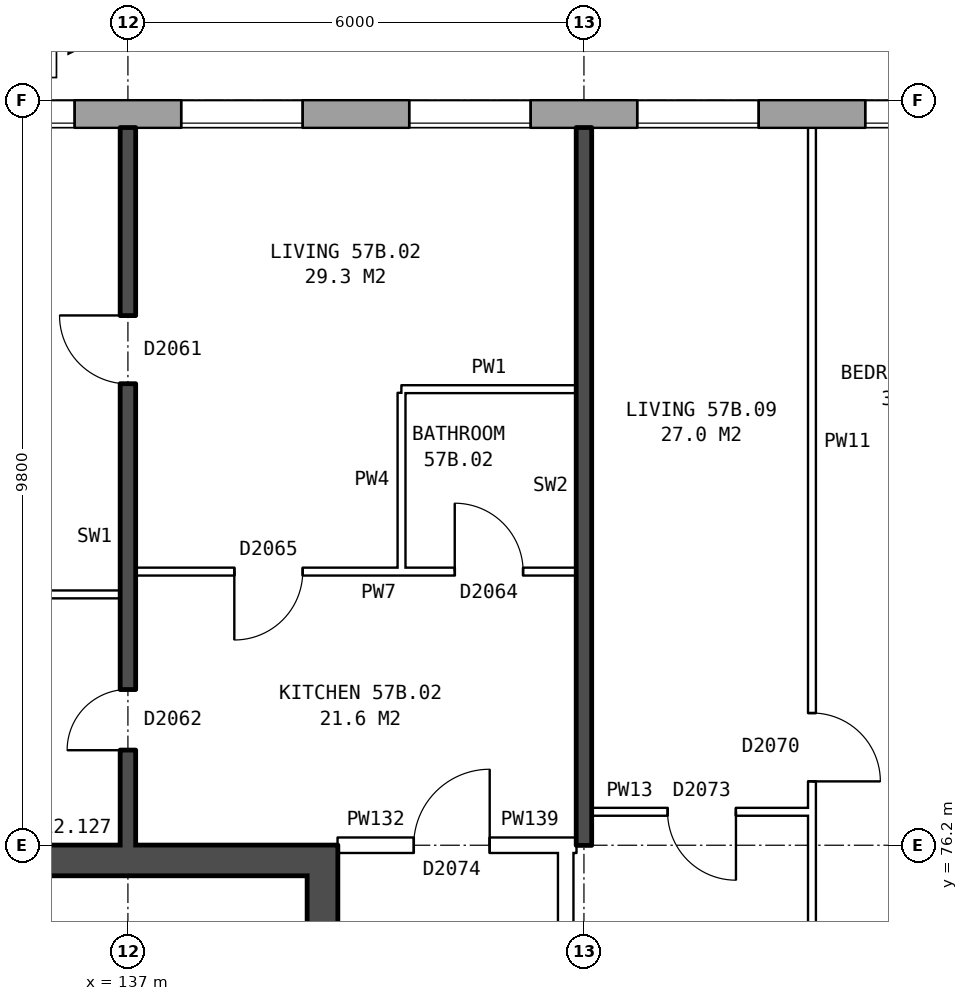
"""IFC4 building model, lengths in metres.
Left out: names, types, materials, properties, quantities, classifications, styles, units other than length and angle.
Written with IfcOpenShell. Run it as: python <this file> out.ifc"""

import sys

from ifc_helpers import new_model, si_unit, direction, frame, frame_2d, origin, place, context, subcontext, project, spatial, rectangle, extrude, element, fill, save


model = new_model("IFC4")
c1 = context("Model", 3, precision=1e-05, world=origin(), true_north=direction((0.0, 1.0)))
c2 = subcontext(c1, "Body", "Model", "MODEL_VIEW")
j1 = project(units=[si_unit("LENGTHUNIT", "METRE"), si_unit("PLANEANGLEUNIT", "RADIAN")], contexts=[c1])
p1 = place(None, origin())
s1 = spatial("IfcSite", under=j1, at=p1, CompositionType="ELEMENT")
p2 = place(p1, origin())
s2 = spatial("IfcBuilding", under=s1, at=p2, CompositionType="ELEMENT")
p3 = place(p2, frame((0.0, 0.0, 202.8)))
s3 = spatial("IfcBuildingStorey", under=s2, at=p3, CompositionType="ELEMENT", Elevation=202.8)
p4 = place(p3, frame((165.925, 85.82, 0.0), z_axis=(0.0, 0.0, 1.0), x_axis=(-1.0, 0.0, 0.0)))
e1 = element("IfcWall", 1, at=p4, inside=s3, PredefinedType="STANDARD", context=c2, shape_type="SweptSolid", body=[
    extrude(rectangle(XDim=33.875, YDim=0.36, at=frame_2d((16.938, 0.0))), origin(), (0.0, 0.0, 1.0), 2.85),
])
p5 = place(p4, frame((2.625, 0.0, 0.8)))
e2 = element("IfcOpeningElement", 2, at=p5, cuts=e1, PredefinedType="OPENING", context=c2, shape_type="SweptSolid", body=[
    extrude(rectangle(XDim=1.6, YDim=1.8, at=frame_2d((0.8, 0.9))), frame((0.0, 0.19, 0.0), z_axis=(0.0, -1.0, 0.0), x_axis=(1.0, 0.0, 0.0)), (0.0, 0.0, 1.0), 0.38),
])
p6 = place(p4, frame((5.625, 0.0, 0.8)))
e3 = element("IfcOpeningElement", 3, at=p6, cuts=e1, PredefinedType="OPENING", context=c2, shape_type="SweptSolid", body=[
    extrude(rectangle(XDim=1.6, YDim=1.8, at=frame_2d((0.8, 0.9))), frame((0.0, 0.19, 0.0), z_axis=(0.0, -1.0, 0.0), x_axis=(1.0, 0.0, 0.0)), (0.0, 0.0, 1.0), 0.38),
])
p7 = place(p4, frame((8.625, 0.0, 0.8)))
e4 = element("IfcOpeningElement", 4, at=p7, cuts=e1, PredefinedType="OPENING", context=c2, shape_type="SweptSolid", body=[
    extrude(rectangle(XDim=1.6, YDim=1.8, at=frame_2d((0.8, 0.9))), frame((0.0, 0.19, 0.0), z_axis=(0.0, -1.0, 0.0), x_axis=(1.0, 0.0, 0.0)), (0.0, 0.0, 1.0), 0.38),
])
p8 = place(p4, frame((11.625, 0.0, 0.8)))
e5 = element("IfcOpeningElement", 5, at=p8, cuts=e1, PredefinedType="OPENING", context=c2, shape_type="SweptSolid", body=[
    extrude(rectangle(XDim=1.6, YDim=1.8, at=frame_2d((0.8, 0.9))), frame((0.0, 0.19, 0.0), z_axis=(0.0, -1.0, 0.0), x_axis=(1.0, 0.0, 0.0)), (0.0, 0.0, 1.0), 0.38),
])
p9 = place(p4, frame((14.625, 0.0, 0.8)))
e6 = element("IfcOpeningElement", 6, at=p9, cuts=e1, PredefinedType="OPENING", context=c2, shape_type="SweptSolid", body=[
    extrude(rectangle(XDim=1.6, YDim=1.8, at=frame_2d((0.8, 0.9))), frame((0.0, 0.19, 0.0), z_axis=(0.0, -1.0, 0.0), x_axis=(1.0, 0.0, 0.0)), (0.0, 0.0, 1.0), 0.38),
])
p10 = place(p4, frame((17.625, 0.0, 0.8)))
e7 = element("IfcOpeningElement", 7, at=p10, cuts=e1, PredefinedType="OPENING", context=c2, shape_type="SweptSolid", body=[
    extrude(rectangle(XDim=1.6, YDim=1.8, at=frame_2d((0.8, 0.9))), frame((0.0, 0.19, 0.0), z_axis=(0.0, -1.0, 0.0), x_axis=(1.0, 0.0, 0.0)), (0.0, 0.0, 1.0), 0.38),
])
p11 = place(p4, frame((20.625, 0.0, 0.8)))
e8 = element("IfcOpeningElement", 8, at=p11, cuts=e1, PredefinedType="OPENING", context=c2, shape_type="SweptSolid", body=[
    extrude(rectangle(XDim=1.6, YDim=1.8, at=frame_2d((0.8, 0.9))), frame((0.0, 0.19, 0.0), z_axis=(0.0, -1.0, 0.0), x_axis=(1.0, 0.0, 0.0)), (0.0, 0.0, 1.0), 0.38),
])
p12 = place(p4, frame((23.625, 0.0, 0.8)))
e9 = element("IfcOpeningElement", 9, at=p12, cuts=e1, PredefinedType="OPENING", context=c2, shape_type="SweptSolid", body=[
    extrude(rectangle(XDim=1.6, YDim=1.8, at=frame_2d((0.8, 0.9))), frame((0.0, 0.19, 0.0), z_axis=(0.0, -1.0, 0.0), x_axis=(1.0, 0.0, 0.0)), (0.0, 0.0, 1.0), 0.38),
])
p13 = place(p4, frame((26.625, 0.0, 0.8)))
e10 = element("IfcOpeningElement", 10, at=p13, cuts=e1, PredefinedType="OPENING", context=c2, shape_type="SweptSolid", body=[
    extrude(rectangle(XDim=1.6, YDim=1.8, at=frame_2d((0.8, 0.9))), frame((0.0, 0.19, 0.0), z_axis=(0.0, -1.0, 0.0), x_axis=(1.0, 0.0, 0.0)), (0.0, 0.0, 1.0), 0.38),
])
p14 = place(p4, frame((29.625, 0.0, 0.8)))
e11 = element("IfcOpeningElement", 11, at=p14, cuts=e1, PredefinedType="OPENING", context=c2, shape_type="SweptSolid", body=[
    extrude(rectangle(XDim=1.6, YDim=1.8, at=frame_2d((0.8, 0.9))), frame((0.0, 0.19, 0.0), z_axis=(0.0, -1.0, 0.0), x_axis=(1.0, 0.0, 0.0)), (0.0, 0.0, 1.0), 0.38),
])
p15 = place(p3, frame((139.56, 63.8, 0.0), z_axis=(0.0, 0.0, 1.0), x_axis=(0.0, 1.0, 0.0)))
e12 = element("IfcWall", 12, at=p15, inside=s3, PredefinedType="SHEAR", context=c2, shape_type="SweptSolid", body=[
    extrude(rectangle(XDim=12.4, YDim=0.4, at=frame_2d((6.2, 0.0))), origin(), (0.0, 0.0, 1.0), 2.85),
])
p16 = place(p15, frame((1.325, 0.0, 0.0)))
e13 = element("IfcOpeningElement", 13, at=p16, cuts=e12, PredefinedType="OPENING", context=c2, shape_type="SweptSolid", body=[
    extrude(rectangle(XDim=1.1, YDim=2.1, at=frame_2d((0.55, 1.05))), frame((0.0, 0.21, 0.0), z_axis=(0.0, -1.0, 0.0), x_axis=(1.0, 0.0, 0.0)), (0.0, 0.0, 1.0), 0.42),
])
p17 = place(p15, frame((3.6, 0.0, 0.0)))
e14 = element("IfcOpeningElement", 14, at=p17, cuts=e12, PredefinedType="OPENING", context=c2, shape_type="SweptSolid", body=[
    extrude(rectangle(XDim=1.1, YDim=2.1, at=frame_2d((0.55, 1.05))), frame((0.0, 0.21, 0.0), z_axis=(0.0, -1.0, 0.0), x_axis=(1.0, 0.0, 0.0)), (0.0, 0.0, 1.0), 0.42),
])
p18 = place(p15, frame((5.8, 0.0, 0.0)))
e15 = element("IfcOpeningElement", 15, at=p18, cuts=e12, PredefinedType="OPENING", context=c2, shape_type="SweptSolid", body=[
    extrude(rectangle(XDim=1.1, YDim=2.1, at=frame_2d((0.55, 1.05))), frame((0.0, 0.21, 0.0), z_axis=(0.0, -1.0, 0.0), x_axis=(1.0, 0.0, 0.0)), (0.0, 0.0, 1.0), 0.42),
])
p19 = place(p15, frame((9.9, 0.0, 0.0)))
e16 = element("IfcOpeningElement", 16, at=p19, cuts=e12, PredefinedType="OPENING", context=c2, shape_type="SweptSolid", body=[
    extrude(rectangle(XDim=1.1, YDim=2.1, at=frame_2d((0.55, 1.05))), frame((0.0, 0.21, 0.0), z_axis=(0.0, -1.0, 0.0), x_axis=(1.0, 0.0, 0.0)), (0.0, 0.0, 1.0), 0.42),
])
p20 = place(p15, frame((8.125, 0.0, 0.0)))
e17 = element("IfcOpeningElement", 17, at=p20, cuts=e12, PredefinedType="OPENING", context=c2, shape_type="SweptSolid", body=[
    extrude(rectangle(XDim=0.85, YDim=2.1, at=frame_2d((0.425, 1.05))), frame((0.0, 0.21, 0.0), z_axis=(0.0, -1.0, 0.0), x_axis=(1.0, 0.0, 0.0)), (0.0, 0.0, 1.0), 0.42),
])
p21 = place(p3, frame((139.36, 76.0, 0.0), z_axis=(0.0, 0.0, 1.0), x_axis=(-1.0, 0.0, 0.0)))
e18 = element("IfcWall", 18, at=p21, inside=s3, PredefinedType="SHEAR", context=c2, shape_type="SweptSolid", body=[
    extrude(rectangle(XDim=7.6, YDim=0.4, at=frame_2d((3.8, 0.0))), origin(), (0.0, 0.0, 1.0), 2.85),
])
p22 = place(p3, frame((142.76, 63.9, 0.0), z_axis=(0.0, 0.0, 1.0), x_axis=(0.0, 1.0, 0.0)))
e19 = element("IfcWall", 19, at=p22, inside=s3, PredefinedType="PARTITIONING", context=c2, shape_type="SweptSolid", body=[
    extrude(rectangle(XDim=12.2, YDim=0.2, at=frame_2d((6.1, 0.0))), origin(), (0.0, 0.0, 1.0), 2.85),
])
p23 = place(p22, frame((5.1, 0.0, 0.0)))
e20 = element("IfcOpeningElement", 20, at=p23, cuts=e19, PredefinedType="OPENING", context=c2, shape_type="SweptSolid", body=[
    extrude(rectangle(XDim=2.0, YDim=2.1, at=frame_2d((1.0, 1.05))), frame((0.0, 0.11, 0.0), z_axis=(0.0, -1.0, 0.0), x_axis=(1.0, 0.0, 0.0)), (0.0, 0.0, 1.0), 0.22),
])
p24 = place(p3, frame((139.76, 76.2, 0.0), z_axis=(0.0, 0.0, 1.0), x_axis=(1.0, 0.0, 0.0)))
e21 = element("IfcWall", 21, at=p24, inside=s3, PredefinedType="PARTITIONING", context=c2, shape_type="SweptSolid", body=[
    extrude(rectangle(XDim=3.0, YDim=0.2, at=frame_2d((1.5, 0.0))), origin(), (0.0, 0.0, 1.0), 2.85),
])
p25 = place(p24, frame((1.0, 0.0, 0.0)))
e22 = element("IfcOpeningElement", 22, at=p25, cuts=e21, PredefinedType="OPENING", context=c2, shape_type="SweptSolid", body=[
    extrude(rectangle(XDim=1.0, YDim=2.1, at=frame_2d((0.5, 1.05))), frame((0.0, 0.11, 0.0), z_axis=(0.0, -1.0, 0.0), x_axis=(1.0, 0.0, 0.0)), (0.0, 0.0, 1.0), 0.22),
])
p26 = place(p3, frame((142.76, 76.2, 0.0), z_axis=(0.0, 0.0, 1.0), x_axis=(1.0, 0.0, 0.0)))
e23 = element("IfcWall", 23, at=p26, inside=s3, PredefinedType="PARTITIONING", context=c2, shape_type="SweptSolid", body=[
    extrude(rectangle(XDim=0.14, YDim=0.2, at=frame_2d((0.07, 0.0))), origin(), (0.0, 0.0, 1.0), 2.85),
])
p27 = place(p3, frame((143.1, 76.64, 0.0), z_axis=(0.0, 0.0, 1.0), x_axis=(1.0, 0.0, 0.0)))
e24 = element("IfcWall", 24, at=p27, inside=s3, PredefinedType="PARTITIONING", context=c2, shape_type="SweptSolid", body=[
    extrude(rectangle(XDim=2.9, YDim=0.1, at=frame_2d((1.45, 0.0))), origin(), (0.0, 0.0, 1.0), 2.85),
])
p28 = place(p27, frame((1.0, 0.0, 0.0)))
e25 = element("IfcOpeningElement", 25, at=p28, cuts=e24, PredefinedType="OPENING", context=c2, shape_type="SweptSolid", body=[
    extrude(rectangle(XDim=0.9, YDim=2.1, at=frame_2d((0.45, 1.05))), frame((0.0, 0.06, 0.0), z_axis=(0.0, -1.0, 0.0), x_axis=(1.0, 0.0, 0.0)), (0.0, 0.0, 1.0), 0.12),
])
p29 = place(p3, frame((131.1, 79.5, 0.0), z_axis=(0.0, 0.0, 1.0), x_axis=(1.0, 0.0, 0.0)))
e26 = element("IfcWall", 26, at=p29, inside=s3, PredefinedType="PARTITIONING", context=c2, shape_type="SweptSolid", body=[
    extrude(rectangle(XDim=5.8, YDim=0.1, at=frame_2d((2.9, 0.0))), origin(), (0.0, 0.0, 1.0), 2.85),
])
p30 = place(p3, frame((137.1, 79.8, 0.0), z_axis=(0.0, 0.0, 1.0), x_axis=(1.0, 0.0, 0.0)))
e27 = element("IfcWall", 27, at=p30, inside=s3, PredefinedType="PARTITIONING", context=c2, shape_type="SweptSolid", body=[
    extrude(rectangle(XDim=5.8, YDim=0.1, at=frame_2d((2.9, 0.0))), origin(), (0.0, 0.0, 1.0), 2.85),
])
p31 = place(p30, frame((1.3, 0.0, 0.0)))
e28 = element("IfcOpeningElement", 28, at=p31, cuts=e27, PredefinedType="OPENING", context=c2, shape_type="SweptSolid", body=[
    extrude(rectangle(XDim=0.9, YDim=2.1, at=frame_2d((0.45, 1.05))), frame((0.0, 0.06, 0.0), z_axis=(0.0, -1.0, 0.0), x_axis=(1.0, 0.0, 0.0)), (0.0, 0.0, 1.0), 0.12),
])
p32 = place(p30, frame((4.2, 0.0, 0.0)))
e29 = element("IfcOpeningElement", 29, at=p32, cuts=e27, PredefinedType="OPENING", context=c2, shape_type="SweptSolid", body=[
    extrude(rectangle(XDim=0.9, YDim=2.1, at=frame_2d((0.45, 1.05))), frame((0.0, 0.06, 0.0), z_axis=(0.0, -1.0, 0.0), x_axis=(1.0, 0.0, 0.0)), (0.0, 0.0, 1.0), 0.12),
])
p33 = place(p3, frame((140.6, 82.2, 0.0), z_axis=(0.0, 0.0, 1.0), x_axis=(1.0, 0.0, 0.0)))
e30 = element("IfcWall", 30, at=p33, inside=s3, PredefinedType="PARTITIONING", context=c2, shape_type="SweptSolid", body=[
    extrude(rectangle(XDim=2.3, YDim=0.1, at=frame_2d((1.15, 0.0))), origin(), (0.0, 0.0, 1.0), 2.85),
])
p34 = place(p3, frame((137.0, 76.2, 0.0), z_axis=(0.0, 0.0, 1.0), x_axis=(0.0, 1.0, 0.0)))
e31 = element("IfcWall", 31, at=p34, inside=s3, PredefinedType="SOLIDWALL", context=c2, shape_type="SweptSolid", body=[
    extrude(rectangle(XDim=9.44, YDim=0.2, at=frame_2d((4.72, 0.0))), origin(), (0.0, 0.0, 1.0), 2.85),
])
p35 = place(p34, frame((6.07, 0.0, 0.0)))
e32 = element("IfcOpeningElement", 32, at=p35, cuts=e31, PredefinedType="OPENING", context=c2, shape_type="SweptSolid", body=[
    extrude(rectangle(XDim=0.9, YDim=2.1, at=frame_2d((0.45, 1.05))), frame((0.0, 0.11, 0.0), z_axis=(0.0, -1.0, 0.0), x_axis=(1.0, 0.0, 0.0)), (0.0, 0.0, 1.0), 0.22),
])
p36 = place(p34, frame((1.25, 0.0, 0.0)))
e33 = element("IfcOpeningElement", 33, at=p36, cuts=e31, PredefinedType="OPENING", context=c2, shape_type="SweptSolid", body=[
    extrude(rectangle(XDim=0.8, YDim=2.1, at=frame_2d((0.4, 1.05))), frame((0.0, 0.11, 0.0), z_axis=(0.0, -1.0, 0.0), x_axis=(1.0, 0.0, 0.0)), (0.0, 0.0, 1.0), 0.22),
])
p37 = place(p3, frame((140.6, 79.85, 0.0), z_axis=(0.0, 0.0, 1.0), x_axis=(0.0, 1.0, 0.0)))
e34 = element("IfcWall", 34, at=p37, inside=s3, PredefinedType="PARTITIONING", context=c2, shape_type="SweptSolid", body=[
    extrude(rectangle(XDim=2.3, YDim=0.1, at=frame_2d((1.15, 0.0))), origin(), (0.0, 0.0, 1.0), 2.85),
])
p38 = place(p3, frame((143.0, 76.2, 0.0), z_axis=(0.0, 0.0, 1.0), x_axis=(0.0, 1.0, 0.0)))
e35 = element("IfcWall", 35, at=p38, inside=s3, PredefinedType="SOLIDWALL", context=c2, shape_type="SweptSolid", body=[
    extrude(rectangle(XDim=9.44, YDim=0.2, at=frame_2d((4.72, 0.0))), origin(), (0.0, 0.0, 1.0), 2.85),
])
p39 = place(p3, frame((146.0, 71.3, 0.0), z_axis=(0.0, 0.0, 1.0), x_axis=(0.0, 1.0, 0.0)))
e36 = element("IfcWall", 36, at=p39, inside=s3, PredefinedType="PARTITIONING", context=c2, shape_type="SweptSolid", body=[
    extrude(rectangle(XDim=14.34, YDim=0.1, at=frame_2d((7.17, 0.0))), origin(), (0.0, 0.0, 1.0), 2.85),
])
p40 = place(p39, frame((5.74, 0.0, 0.0)))
e37 = element("IfcOpeningElement", 37, at=p40, cuts=e36, PredefinedType="OPENING", context=c2, shape_type="SweptSolid", body=[
    extrude(rectangle(XDim=0.9, YDim=2.1, at=frame_2d((0.45, 1.05))), frame((0.0, 0.06, 0.0), z_axis=(0.0, -1.0, 0.0), x_axis=(1.0, 0.0, 0.0)), (0.0, 0.0, 1.0), 0.12),
])
p41 = place(p39, frame((0.4, 0.0, 0.0)))
e38 = element("IfcOpeningElement", 38, at=p41, cuts=e36, PredefinedType="OPENING", context=c2, shape_type="SweptSolid", body=[
    extrude(rectangle(XDim=0.9, YDim=2.1, at=frame_2d((0.45, 1.05))), frame((0.0, 0.06, 0.0), z_axis=(0.0, -1.0, 0.0), x_axis=(1.0, 0.0, 0.0)), (0.0, 0.0, 1.0), 0.12),
])
p42 = place(p10, origin())
e39 = element("IfcWindow", 39, at=p42, inside=s3, PartitioningType="SINGLE_PANEL", PredefinedType="WINDOW", context=c2, shape_type="SweptSolid", body=[
    extrude(rectangle(XDim=1.6, YDim=1.8, at=frame_2d((0.8, 0.9))), frame((0.0, 0.15, 0.0), z_axis=(0.0, -1.0, 0.0), x_axis=(1.0, 0.0, 0.0)), (0.0, 0.0, 1.0), 0.06),
])
fill(e7, e39)
p43 = place(p11, origin())
e40 = element("IfcWindow", 40, at=p43, inside=s3, PartitioningType="SINGLE_PANEL", PredefinedType="WINDOW", context=c2, shape_type="SweptSolid", body=[
    extrude(rectangle(XDim=1.6, YDim=1.8, at=frame_2d((0.8, 0.9))), frame((0.0, 0.15, 0.0), z_axis=(0.0, -1.0, 0.0), x_axis=(1.0, 0.0, 0.0)), (0.0, 0.0, 1.0), 0.06),
])
fill(e8, e40)
p44 = place(p12, origin())
e41 = element("IfcWindow", 41, at=p44, inside=s3, PartitioningType="SINGLE_PANEL", PredefinedType="WINDOW", context=c2, shape_type="SweptSolid", body=[
    extrude(rectangle(XDim=1.6, YDim=1.8, at=frame_2d((0.8, 0.9))), frame((0.0, 0.15, 0.0), z_axis=(0.0, -1.0, 0.0), x_axis=(1.0, 0.0, 0.0)), (0.0, 0.0, 1.0), 0.06),
])
fill(e9, e41)
p45 = place(p13, origin())
e42 = element("IfcWindow", 42, at=p45, inside=s3, PartitioningType="SINGLE_PANEL", PredefinedType="WINDOW", context=c2, shape_type="SweptSolid", body=[
    extrude(rectangle(XDim=1.6, YDim=1.8, at=frame_2d((0.8, 0.9))), frame((0.0, 0.15, 0.0), z_axis=(0.0, -1.0, 0.0), x_axis=(1.0, 0.0, 0.0)), (0.0, 0.0, 1.0), 0.06),
])
fill(e10, e42)
p46 = place(p14, origin())
e43 = element("IfcWindow", 43, at=p46, inside=s3, PartitioningType="SINGLE_PANEL", PredefinedType="WINDOW", context=c2, shape_type="SweptSolid", body=[
    extrude(rectangle(XDim=1.6, YDim=1.8, at=frame_2d((0.8, 0.9))), frame((0.0, 0.15, 0.0), z_axis=(0.0, -1.0, 0.0), x_axis=(1.0, 0.0, 0.0)), (0.0, 0.0, 1.0), 0.06),
])
fill(e11, e43)
p47 = place(p35, origin())
e44 = element("IfcDoor", 44, at=p47, inside=s3, OperationType="SINGLE_SWING_RIGHT", PredefinedType="DOOR", context=c2, shape_type="SweptSolid", body=[
    extrude(rectangle(XDim=0.9, YDim=2.1, at=frame_2d((0.45, 1.05))), frame((0.0, 0.025, 0.0), z_axis=(0.0, -1.0, 0.0), x_axis=(1.0, 0.0, 0.0)), (0.0, 0.0, 1.0), 0.05),
])
fill(e32, e44)
p48 = place(p25, origin())
e45 = element("IfcDoor", 45, at=p48, inside=s3, OperationType="SINGLE_SWING_RIGHT", PredefinedType="DOOR", context=c2, shape_type="SweptSolid", body=[
    extrude(rectangle(XDim=1.0, YDim=2.1, at=frame_2d((0.5, 1.05))), frame((0.0, 0.025, 0.0), z_axis=(0.0, -1.0, 0.0), x_axis=(1.0, 0.0, 0.0)), (0.0, 0.0, 1.0), 0.05),
])
fill(e22, e45)
p49 = place(p31, frame((0.9, 0.0, 0.0), z_axis=(0.0, 0.0, 1.0), x_axis=(-1.0, 0.0, 0.0)))
e46 = element("IfcDoor", 46, at=p49, inside=s3, OperationType="SINGLE_SWING_RIGHT", PredefinedType="DOOR", context=c2, shape_type="SweptSolid", body=[
    extrude(rectangle(XDim=0.9, YDim=2.1, at=frame_2d((0.45, 1.05))), frame((0.0, 0.025, 0.0), z_axis=(0.0, -1.0, 0.0), x_axis=(1.0, 0.0, 0.0)), (0.0, 0.0, 1.0), 0.05),
])
fill(e28, e46)
p50 = place(p36, origin())
e47 = element("IfcDoor", 47, at=p50, inside=s3, OperationType="SINGLE_SWING_LEFT", PredefinedType="DOOR", context=c2, shape_type="SweptSolid", body=[
    extrude(rectangle(XDim=0.8, YDim=2.1, at=frame_2d((0.4, 1.05))), frame((0.0, 0.025, 0.0), z_axis=(0.0, -1.0, 0.0), x_axis=(1.0, 0.0, 0.0)), (0.0, 0.0, 1.0), 0.05),
])
fill(e33, e47)
p51 = place(p32, origin())
e48 = element("IfcDoor", 48, at=p51, inside=s3, OperationType="SINGLE_SWING_LEFT", PredefinedType="DOOR", context=c2, shape_type="SweptSolid", body=[
    extrude(rectangle(XDim=0.9, YDim=2.1, at=frame_2d((0.45, 1.05))), frame((0.0, 0.025, 0.0), z_axis=(0.0, -1.0, 0.0), x_axis=(1.0, 0.0, 0.0)), (0.0, 0.0, 1.0), 0.05),
])
fill(e29, e48)
p52 = place(p40, frame((0.9, 0.0, 0.0), z_axis=(0.0, 0.0, 1.0), x_axis=(-1.0, 0.0, 0.0)))
e49 = element("IfcDoor", 49, at=p52, inside=s3, OperationType="SINGLE_SWING_RIGHT", PredefinedType="DOOR", context=c2, shape_type="SweptSolid", body=[
    extrude(rectangle(XDim=0.9, YDim=2.1, at=frame_2d((0.45, 1.05))), frame((0.0, 0.025, 0.0), z_axis=(0.0, -1.0, 0.0), x_axis=(1.0, 0.0, 0.0)), (0.0, 0.0, 1.0), 0.05),
])
fill(e37, e49)
p53 = place(p28, frame((0.9, 0.0, 0.0), z_axis=(0.0, 0.0, 1.0), x_axis=(-1.0, 0.0, 0.0)))
e50 = element("IfcDoor", 50, at=p53, inside=s3, OperationType="SINGLE_SWING_LEFT", PredefinedType="DOOR", context=c2, shape_type="SweptSolid", body=[
    extrude(rectangle(XDim=0.9, YDim=2.1, at=frame_2d((0.45, 1.05))), frame((0.0, 0.025, 0.0), z_axis=(0.0, -1.0, 0.0), x_axis=(1.0, 0.0, 0.0)), (0.0, 0.0, 1.0), 0.05),
])
fill(e25, e50)
save(model, sys.argv[1])
